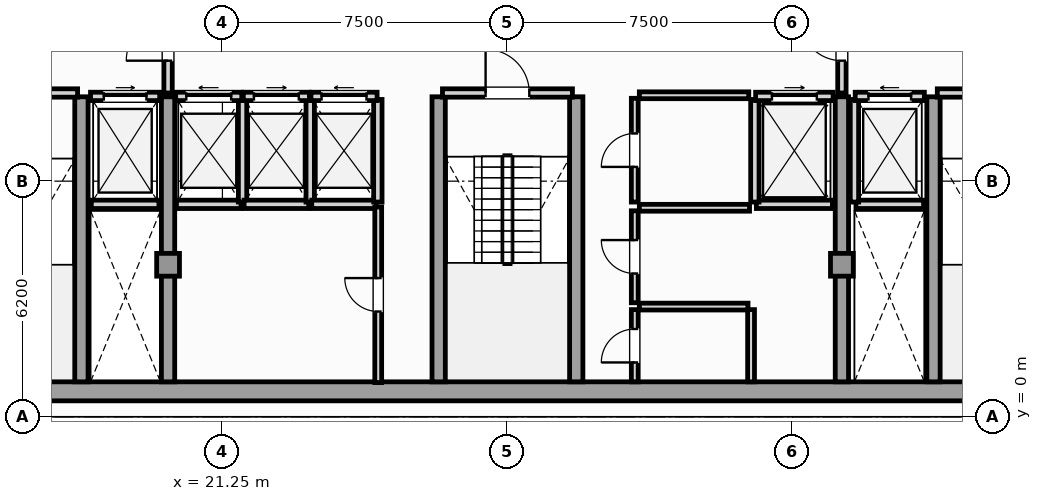
"""IFC4 building model, lengths in metres.
Left out: names, types, materials, properties, quantities, classifications, styles, units other than length and angle.
Written with IfcOpenShell. Run it as: python <this file> out.ifc"""

import sys

from ifc_helpers import new_model, si_unit, direction, frame, frame_2d, origin, origin_2d, place, context, subcontext, project, spatial, rectangle, extrude, element, fill, save


model = new_model("IFC4")
c1 = context("Model", 3, precision=1e-05, world=origin(), true_north=direction((0.0, 1.0)))
c2 = subcontext(c1, "Body", "Model", "MODEL_VIEW")
j1 = project(units=[si_unit("LENGTHUNIT", "METRE"), si_unit("PLANEANGLEUNIT", "RADIAN")], contexts=[c1])
p1 = place(None, origin())
s1 = spatial("IfcSite", under=j1, at=p1, CompositionType="ELEMENT")
p2 = place(p1, origin())
s2 = spatial("IfcBuilding", under=s1, at=p2, CompositionType="ELEMENT")
p3 = place(p2, frame((0.0, 0.0, 313.05)))
s3 = spatial("IfcBuildingStorey", under=s2, at=p3, CompositionType="ELEMENT", Elevation=313.05)
p4 = place(p3, frame((13.25, 0.67, 0.0), z_axis=(0.0, 0.0, 1.0), x_axis=(1.0, 0.0, 0.0)))
e1 = element("IfcWall", 1, at=p4, inside=s3, PredefinedType="SHEAR", context=c2, shape_type="SweptSolid", body=[
    extrude(rectangle(XDim=31.0, YDim=0.5, at=frame_2d((15.5, 0.0))), origin(), (0.0, 0.0, 1.0), 3.65),
])
for number, where, z_axis, x_axis in (
    (2, (17.54, 0.92, 0.0), (0.0, 0.0, 1.0), (0.0, 1.0, 0.0)),
    (3, (19.82, 0.92, 0.0), (0.0, 0.0, 1.0), (0.0, 1.0, 0.0)),
    (4, (26.94, 0.92, 0.0), (0.0, 0.0, 1.0), (0.0, 1.0, 0.0)),
    (5, (30.56, 0.92, 0.0), (0.0, 0.0, 1.0), (0.0, 1.0, 0.0)),
    (6, (37.55, 0.92, 0.0), (0.0, 0.0, 1.0), (0.0, 1.0, 0.0)),
    (7, (39.96, 0.92, 0.0), (0.0, 0.0, 1.0), (0.0, 1.0, 0.0)),
):
    element("IfcWall", number, at=place(p3, frame(where, z_axis=z_axis, x_axis=x_axis)), inside=s3, PredefinedType="SHEAR", context=c2, shape_type="SweptSolid", body=[
        extrude(rectangle(XDim=7.5, YDim=0.35, at=frame_2d((3.75, 0.0))), origin(), (0.0, 0.0, 1.0), 3.65),
    ])
for number, where, z_axis, x_axis in (
    (8, (19.82, 4.0, 0.0), (0.0, 0.0, 1.0), (1.0, 0.0, 0.0)),
    (9, (37.55, 4.0, 0.0), (0.0, 0.0, 1.0), (1.0, 0.0, 0.0)),
):
    element("IfcColumn", number, at=place(p3, frame(where, z_axis=z_axis, x_axis=x_axis)), inside=s3, PredefinedType="COLUMN", context=c2, shape_type="SweptSolid", body=[
        extrude(rectangle(XDim=0.6, YDim=0.6, at=origin_2d()), origin(), (0.0, 0.0, 1.0), 3.85),
    ])
p5 = place(p3, frame((17.8, 5.59, 0.0), z_axis=(0.0, 0.0, 1.0), x_axis=(1.0, 0.0, 0.0)))
e10 = element("IfcWall", 10, at=p5, inside=s3, PredefinedType="SOLIDWALL", context=c2, shape_type="SweptSolid", body=[
    extrude(rectangle(XDim=1.78, YDim=0.22, at=frame_2d((0.89, 0.0))), origin(), (0.0, 0.0, 1.0), 3.65),
])
p6 = place(p3, frame((17.78, 8.43, 0.0), z_axis=(0.0, 0.0, 1.0), x_axis=(1.0, 0.0, 0.0)))
e11 = element("IfcWall", 11, at=p6, inside=s3, PredefinedType="SOLIDWALL", context=c2, shape_type="SweptSolid", body=[
    extrude(rectangle(XDim=1.82, YDim=0.22, at=frame_2d((0.91, 0.0))), origin(), (0.0, 0.0, 1.0), 3.65),
])
p7 = place(p6, frame((0.35, 0.0, 0.0)))
e12 = element("IfcOpeningElement", 12, at=p7, cuts=e11, PredefinedType="OPENING", context=c2, shape_type="SweptSolid", body=[
    extrude(rectangle(XDim=1.12, YDim=2.25, at=frame_2d((0.56, 1.125))), frame((0.0, 0.12, 0.0), z_axis=(0.0, -1.0, 0.0), x_axis=(1.0, 0.0, 0.0)), (0.0, 0.0, 1.0), 0.24),
])
p8 = place(p3, frame((37.92, 5.59, 0.0), z_axis=(0.0, 0.0, 1.0), x_axis=(1.0, 0.0, 0.0)))
e13 = element("IfcWall", 13, at=p8, inside=s3, PredefinedType="SOLIDWALL", context=c2, shape_type="SweptSolid", body=[
    extrude(rectangle(XDim=1.78, YDim=0.22, at=frame_2d((0.89, 0.0))), origin(), (0.0, 0.0, 1.0), 3.65),
])
p9 = place(p3, frame((37.88, 5.65, 0.0), z_axis=(0.0, 0.0, 1.0), x_axis=(0.0, 1.0, 0.0)))
e14 = element("IfcWall", 14, at=p9, inside=s3, PredefinedType="SOLIDWALL", context=c2, shape_type="SweptSolid", body=[
    extrude(rectangle(XDim=2.7, YDim=0.22, at=frame_2d((1.35, 0.0))), origin(), (0.0, 0.0, 1.0), 3.65),
])
p10 = place(p3, frame((37.9, 8.43, 0.0), z_axis=(0.0, 0.0, 1.0), x_axis=(1.0, 0.0, 0.0)))
e15 = element("IfcWall", 15, at=p10, inside=s3, PredefinedType="SOLIDWALL", context=c2, shape_type="SweptSolid", body=[
    extrude(rectangle(XDim=1.82, YDim=0.22, at=frame_2d((0.91, 0.0))), origin(), (0.0, 0.0, 1.0), 3.65),
])
p11 = place(p10, frame((0.35, 0.0, 0.0)))
e16 = element("IfcOpeningElement", 16, at=p11, cuts=e15, PredefinedType="OPENING", context=c2, shape_type="SweptSolid", body=[
    extrude(rectangle(XDim=1.12, YDim=2.25, at=frame_2d((0.56, 1.125))), frame((0.0, 0.12, 0.0), z_axis=(0.0, -1.0, 0.0), x_axis=(1.0, 0.0, 0.0)), (0.0, 0.0, 1.0), 0.24),
])
p12 = place(p3, frame((35.3, 5.59, 0.0), z_axis=(0.0, 0.0, 1.0), x_axis=(1.0, 0.0, 0.0)))
e17 = element("IfcWall", 17, at=p12, inside=s3, PredefinedType="SOLIDWALL", context=c2, shape_type="SweptSolid", body=[
    extrude(rectangle(XDim=2.0, YDim=0.22, at=frame_2d((1.0, 0.0))), origin(), (0.0, 0.0, 1.0), 3.65),
])
p13 = place(p3, frame((35.26, 5.65, 0.0), z_axis=(0.0, 0.0, 1.0), x_axis=(0.0, 1.0, 0.0)))
e18 = element("IfcWall", 18, at=p13, inside=s3, PredefinedType="SOLIDWALL", context=c2, shape_type="SweptSolid", body=[
    extrude(rectangle(XDim=2.7, YDim=0.22, at=frame_2d((1.35, 0.0))), origin(), (0.0, 0.0, 1.0), 3.65),
])
p14 = place(p3, frame((35.28, 8.43, 0.0), z_axis=(0.0, 0.0, 1.0), x_axis=(1.0, 0.0, 0.0)))
e19 = element("IfcWall", 19, at=p14, inside=s3, PredefinedType="SOLIDWALL", context=c2, shape_type="SweptSolid", body=[
    extrude(rectangle(XDim=2.04, YDim=0.22, at=frame_2d((1.02, 0.0))), origin(), (0.0, 0.0, 1.0), 3.65),
])
p15 = place(p14, frame((0.43, 0.0, 0.0)))
e20 = element("IfcOpeningElement", 20, at=p15, cuts=e19, PredefinedType="OPENING", context=c2, shape_type="SweptSolid", body=[
    extrude(rectangle(XDim=1.18, YDim=2.2, at=frame_2d((0.59, 1.1))), frame((0.0, 0.12, 0.0), z_axis=(0.0, -1.0, 0.0), x_axis=(1.0, 0.0, 0.0)), (0.0, 0.0, 1.0), 0.24),
])
p16 = place(p3, frame((20.04, 5.59, 0.0), z_axis=(0.0, 0.0, 1.0), x_axis=(1.0, 0.0, 0.0)))
e21 = element("IfcWall", 21, at=p16, inside=s3, PredefinedType="SOLIDWALL", context=c2, shape_type="SweptSolid", body=[
    extrude(rectangle(XDim=1.7, YDim=0.22, at=frame_2d((0.85, 0.0))), origin(), (0.0, 0.0, 1.0), 3.65),
])
p17 = place(p3, frame((21.78, 5.65, 0.0), z_axis=(0.0, 0.0, 1.0), x_axis=(0.0, 1.0, 0.0)))
e22 = element("IfcWall", 22, at=p17, inside=s3, PredefinedType="SOLIDWALL", context=c2, shape_type="SweptSolid", body=[
    extrude(rectangle(XDim=2.7, YDim=0.22, at=frame_2d((1.35, 0.0))), origin(), (0.0, 0.0, 1.0), 3.65),
])
p18 = place(p3, frame((20.02, 8.43, 0.0), z_axis=(0.0, 0.0, 1.0), x_axis=(1.0, 0.0, 0.0)))
e23 = element("IfcWall", 23, at=p18, inside=s3, PredefinedType="SOLIDWALL", context=c2, shape_type="SweptSolid", body=[
    extrude(rectangle(XDim=1.74, YDim=0.22, at=frame_2d((0.87, 0.0))), origin(), (0.0, 0.0, 1.0), 3.65),
])
p19 = place(p18, frame((0.28, 0.0, 0.0)))
e24 = element("IfcOpeningElement", 24, at=p19, cuts=e23, PredefinedType="OPENING", context=c2, shape_type="SweptSolid", body=[
    extrude(rectangle(XDim=1.18, YDim=2.2, at=frame_2d((0.59, 1.1))), frame((0.0, 0.12, 0.0), z_axis=(0.0, -1.0, 0.0), x_axis=(1.0, 0.0, 0.0)), (0.0, 0.0, 1.0), 0.24),
])
p20 = place(p3, frame((21.82, 5.59, 0.0), z_axis=(0.0, 0.0, 1.0), x_axis=(1.0, 0.0, 0.0)))
e25 = element("IfcWall", 25, at=p20, inside=s3, PredefinedType="SOLIDWALL", context=c2, shape_type="SweptSolid", body=[
    extrude(rectangle(XDim=1.7, YDim=0.22, at=frame_2d((0.85, 0.0))), origin(), (0.0, 0.0, 1.0), 3.65),
])
p21 = place(p3, frame((23.56, 5.65, 0.0), z_axis=(0.0, 0.0, 1.0), x_axis=(0.0, 1.0, 0.0)))
e26 = element("IfcWall", 26, at=p21, inside=s3, PredefinedType="SOLIDWALL", context=c2, shape_type="SweptSolid", body=[
    extrude(rectangle(XDim=2.7, YDim=0.22, at=frame_2d((1.35, 0.0))), origin(), (0.0, 0.0, 1.0), 3.65),
])
p22 = place(p3, frame((21.8, 8.43, 0.0), z_axis=(0.0, 0.0, 1.0), x_axis=(1.0, 0.0, 0.0)))
e27 = element("IfcWall", 27, at=p22, inside=s3, PredefinedType="SOLIDWALL", context=c2, shape_type="SweptSolid", body=[
    extrude(rectangle(XDim=1.74, YDim=0.22, at=frame_2d((0.87, 0.0))), origin(), (0.0, 0.0, 1.0), 3.65),
])
p23 = place(p22, frame((0.28, 0.0, 0.0)))
e28 = element("IfcOpeningElement", 28, at=p23, cuts=e27, PredefinedType="OPENING", context=c2, shape_type="SweptSolid", body=[
    extrude(rectangle(XDim=1.18, YDim=2.2, at=frame_2d((0.59, 1.1))), frame((0.0, 0.12, 0.0), z_axis=(0.0, -1.0, 0.0), x_axis=(1.0, 0.0, 0.0)), (0.0, 0.0, 1.0), 0.24),
])
p24 = place(p3, frame((23.6, 5.59, 0.0), z_axis=(0.0, 0.0, 1.0), x_axis=(1.0, 0.0, 0.0)))
e29 = element("IfcWall", 29, at=p24, inside=s3, PredefinedType="SOLIDWALL", context=c2, shape_type="SweptSolid", body=[
    extrude(rectangle(XDim=1.7, YDim=0.22, at=frame_2d((0.85, 0.0))), origin(), (0.0, 0.0, 1.0), 3.65),
])
p25 = place(p3, frame((25.34, 5.65, 0.0), z_axis=(0.0, 0.0, 1.0), x_axis=(0.0, 1.0, 0.0)))
e30 = element("IfcWall", 30, at=p25, inside=s3, PredefinedType="SOLIDWALL", context=c2, shape_type="SweptSolid", body=[
    extrude(rectangle(XDim=2.7, YDim=0.22, at=frame_2d((1.35, 0.0))), origin(), (0.0, 0.0, 1.0), 3.65),
])
p26 = place(p3, frame((23.58, 8.43, 0.0), z_axis=(0.0, 0.0, 1.0), x_axis=(1.0, 0.0, 0.0)))
e31 = element("IfcWall", 31, at=p26, inside=s3, PredefinedType="SOLIDWALL", context=c2, shape_type="SweptSolid", body=[
    extrude(rectangle(XDim=1.74, YDim=0.22, at=frame_2d((0.87, 0.0))), origin(), (0.0, 0.0, 1.0), 3.65),
])
p27 = place(p26, frame((0.28, 0.0, 0.0)))
e32 = element("IfcOpeningElement", 32, at=p27, cuts=e31, PredefinedType="OPENING", context=c2, shape_type="SweptSolid", body=[
    extrude(rectangle(XDim=1.18, YDim=2.2, at=frame_2d((0.59, 1.1))), frame((0.0, 0.12, 0.0), z_axis=(0.0, -1.0, 0.0), x_axis=(1.0, 0.0, 0.0)), (0.0, 0.0, 1.0), 0.24),
])
p28 = place(p3, frame((14.04, 8.52, 0.0), z_axis=(0.0, 0.0, 1.0), x_axis=(1.0, 0.0, 0.0)))
e33 = element("IfcWall", 33, at=p28, inside=s3, PredefinedType="SOLIDWALL", context=c2, shape_type="SweptSolid", body=[
    extrude(rectangle(XDim=3.4, YDim=0.22, at=frame_2d((1.7, 0.0))), origin(), (0.0, 0.0, 1.0), 3.65),
])
p29 = place(p28, frame((1.125, 0.0, 0.0)))
e34 = element("IfcOpeningElement", 34, at=p29, cuts=e33, PredefinedType="OPENING", context=c2, shape_type="SweptSolid", body=[
    extrude(rectangle(XDim=1.15, YDim=2.2, at=frame_2d((0.575, 1.1))), frame((0.0, 0.12, 0.0), z_axis=(0.0, -1.0, 0.0), x_axis=(1.0, 0.0, 0.0)), (0.0, 0.0, 1.0), 0.24),
])
p30 = place(p3, frame((40.06, 8.52, 0.0), z_axis=(0.0, 0.0, 1.0), x_axis=(1.0, 0.0, 0.0)))
e35 = element("IfcWall", 35, at=p30, inside=s3, PredefinedType="SOLIDWALL", context=c2, shape_type="SweptSolid", body=[
    extrude(rectangle(XDim=3.4, YDim=0.22, at=frame_2d((1.7, 0.0))), origin(), (0.0, 0.0, 1.0), 3.65),
])
p31 = place(p30, frame((1.125, 0.0, 0.0)))
e36 = element("IfcOpeningElement", 36, at=p31, cuts=e35, PredefinedType="OPENING", context=c2, shape_type="SweptSolid", body=[
    extrude(rectangle(XDim=1.15, YDim=2.2, at=frame_2d((0.575, 1.1))), frame((0.0, 0.12, 0.0), z_axis=(0.0, -1.0, 0.0), x_axis=(1.0, 0.0, 0.0)), (0.0, 0.0, 1.0), 0.24),
])
p32 = place(p3, frame((27.04, 8.52, 0.0), z_axis=(0.0, 0.0, 1.0), x_axis=(1.0, 0.0, 0.0)))
e37 = element("IfcWall", 37, at=p32, inside=s3, PredefinedType="SOLIDWALL", context=c2, shape_type="SweptSolid", body=[
    extrude(rectangle(XDim=3.42, YDim=0.22, at=frame_2d((1.71, 0.0))), origin(), (0.0, 0.0, 1.0), 3.65),
])
p33 = place(p32, frame((1.135, 0.0, 0.0)))
e38 = element("IfcOpeningElement", 38, at=p33, cuts=e37, PredefinedType="OPENING", context=c2, shape_type="SweptSolid", body=[
    extrude(rectangle(XDim=1.15, YDim=2.2, at=frame_2d((0.575, 1.1))), frame((0.0, 0.12, 0.0), z_axis=(0.0, -1.0, 0.0), x_axis=(1.0, 0.0, 0.0)), (0.0, 0.0, 1.0), 0.24),
])
p34 = place(p3, frame((19.82, 8.52, 0.0), z_axis=(0.0, 0.0, 1.0), x_axis=(0.0, 1.0, 0.0)))
e39 = element("IfcWall", 39, at=p34, inside=s3, PredefinedType="SOLIDWALL", context=c2, shape_type="SweptSolid", body=[
    extrude(rectangle(XDim=2.8, YDim=0.22, at=frame_2d((1.4, 0.0))), origin(), (0.0, 0.0, 1.0), 3.105),
])
p35 = place(p34, frame((0.85, 0.0, 0.0)))
e40 = element("IfcOpeningElement", 40, at=p35, cuts=e39, PredefinedType="OPENING", context=c2, shape_type="SweptSolid", body=[
    extrude(rectangle(XDim=1.1, YDim=2.2, at=frame_2d((0.55, 1.1))), frame((0.0, 0.12, 0.0), z_axis=(0.0, -1.0, 0.0), x_axis=(1.0, 0.0, 0.0)), (0.0, 0.0, 1.0), 0.24),
])
p36 = place(p3, frame((37.55, 8.52, 0.0), z_axis=(0.0, 0.0, 1.0), x_axis=(0.0, 1.0, 0.0)))
e41 = element("IfcWall", 41, at=p36, inside=s3, PredefinedType="SOLIDWALL", context=c2, shape_type="SweptSolid", body=[
    extrude(rectangle(XDim=2.8, YDim=0.22, at=frame_2d((1.4, 0.0))), origin(), (0.0, 0.0, 1.0), 3.105),
])
p37 = place(p36, frame((0.85, 0.0, 0.0)))
e42 = element("IfcOpeningElement", 42, at=p37, cuts=e41, PredefinedType="OPENING", context=c2, shape_type="SweptSolid", body=[
    extrude(rectangle(XDim=1.1, YDim=2.2, at=frame_2d((0.55, 1.1))), frame((0.0, 0.12, 0.0), z_axis=(0.0, -1.0, 0.0), x_axis=(1.0, 0.0, 0.0)), (0.0, 0.0, 1.0), 0.24),
])
p38 = place(p3, frame((25.35, 0.9, 0.0), z_axis=(0.0, 0.0, 1.0), x_axis=(0.0, 1.0, 0.0)))
e43 = element("IfcWall", 43, at=p38, inside=s3, PredefinedType="PARTITIONING", context=c2, shape_type="SweptSolid", body=[
    extrude(rectangle(XDim=4.62, YDim=0.18, at=frame_2d((2.31, 0.0))), origin(), (0.0, 0.0, 1.0), 3.65),
])
p39 = place(p38, frame((1.87, 0.0, 0.0)))
e44 = element("IfcOpeningElement", 44, at=p39, cuts=e43, PredefinedType="OPENING", context=c2, shape_type="SweptSolid", body=[
    extrude(rectangle(XDim=0.88, YDim=2.05, at=frame_2d((0.44, 1.025))), frame((0.0, 0.1, 0.0), z_axis=(0.0, -1.0, 0.0), x_axis=(1.0, 0.0, 0.0)), (0.0, 0.0, 1.0), 0.2),
])
p40 = place(p3, frame((32.1, 0.92, 0.0), z_axis=(0.0, 0.0, 1.0), x_axis=(0.0, 1.0, 0.0)))
e45 = element("IfcWall", 45, at=p40, inside=s3, PredefinedType="PARTITIONING", context=c2, shape_type="SweptSolid", body=[
    extrude(rectangle(XDim=1.9, YDim=0.18, at=frame_2d((0.95, 0.0))), origin(), (0.0, 0.0, 1.0), 3.65),
])
p41 = place(p40, frame((0.51, 0.0, 0.0)))
e46 = element("IfcOpeningElement", 46, at=p41, cuts=e45, PredefinedType="OPENING", context=c2, shape_type="SweptSolid", body=[
    extrude(rectangle(XDim=0.88, YDim=2.05, at=frame_2d((0.44, 1.025))), frame((0.0, 0.1, 0.0), z_axis=(0.0, -1.0, 0.0), x_axis=(1.0, 0.0, 0.0)), (0.0, 0.0, 1.0), 0.2),
])
p42 = place(p3, frame((32.22, 2.9, 0.0), z_axis=(0.0, 0.0, 1.0), x_axis=(1.0, 0.0, 0.0)))
e47 = element("IfcWall", 47, at=p42, inside=s3, PredefinedType="PARTITIONING", context=c2, shape_type="SweptSolid", body=[
    extrude(rectangle(XDim=2.86, YDim=0.18, at=frame_2d((1.43, 0.0))), origin(), (0.0, 0.0, 1.0), 3.65),
])
p43 = place(p3, frame((35.16, 0.92, 0.0), z_axis=(0.0, 0.0, 1.0), x_axis=(0.0, 1.0, 0.0)))
e48 = element("IfcWall", 48, at=p43, inside=s3, PredefinedType="PARTITIONING", context=c2, shape_type="SweptSolid", body=[
    extrude(rectangle(XDim=1.9, YDim=0.18, at=frame_2d((0.95, 0.0))), origin(), (0.0, 0.0, 1.0), 3.65),
])
p44 = place(p3, frame((32.1, 3.0, 0.0), z_axis=(0.0, 0.0, 1.0), x_axis=(0.0, 1.0, 0.0)))
e49 = element("IfcWall", 49, at=p44, inside=s3, PredefinedType="PARTITIONING", context=c2, shape_type="SweptSolid", body=[
    extrude(rectangle(XDim=2.42, YDim=0.18, at=frame_2d((1.21, 0.0))), origin(), (0.0, 0.0, 1.0), 3.65),
])
p45 = place(p44, frame((0.77, 0.0, 0.0)))
e50 = element("IfcOpeningElement", 50, at=p45, cuts=e49, PredefinedType="OPENING", context=c2, shape_type="SweptSolid", body=[
    extrude(rectangle(XDim=0.88, YDim=2.05, at=frame_2d((0.44, 1.025))), frame((0.0, 0.1, 0.0), z_axis=(0.0, -1.0, 0.0), x_axis=(1.0, 0.0, 0.0)), (0.0, 0.0, 1.0), 0.2),
])
p46 = place(p3, frame((32.22, 5.5, 0.0), z_axis=(0.0, 0.0, 1.0), x_axis=(1.0, 0.0, 0.0)))
e51 = element("IfcWall", 51, at=p46, inside=s3, PredefinedType="PARTITIONING", context=c2, shape_type="SweptSolid", body=[
    extrude(rectangle(XDim=2.9, YDim=0.18, at=frame_2d((1.45, 0.0))), origin(), (0.0, 0.0, 1.0), 3.65),
])
p47 = place(p3, frame((32.1, 5.65, 0.0), z_axis=(0.0, 0.0, 1.0), x_axis=(0.0, 1.0, 0.0)))
e52 = element("IfcWall", 52, at=p47, inside=s3, PredefinedType="PARTITIONING", context=c2, shape_type="SweptSolid", body=[
    extrude(rectangle(XDim=2.73, YDim=0.18, at=frame_2d((1.365, 0.0))), origin(), (0.0, 0.0, 1.0), 3.65),
])
p48 = place(p47, frame((0.925, 0.0, 0.0)))
e53 = element("IfcOpeningElement", 53, at=p48, cuts=e52, PredefinedType="OPENING", context=c2, shape_type="SweptSolid", body=[
    extrude(rectangle(XDim=0.88, YDim=2.05, at=frame_2d((0.44, 1.025))), frame((0.0, 0.1, 0.0), z_axis=(0.0, -1.0, 0.0), x_axis=(1.0, 0.0, 0.0)), (0.0, 0.0, 1.0), 0.2),
])
p49 = place(p3, frame((32.22, 8.46, 0.0), z_axis=(0.0, 0.0, 1.0), x_axis=(1.0, 0.0, 0.0)))
e54 = element("IfcWall", 54, at=p49, inside=s3, PredefinedType="PARTITIONING", context=c2, shape_type="SweptSolid", body=[
    extrude(rectangle(XDim=2.88, YDim=0.18, at=frame_2d((1.44, 0.0))), origin(), (0.0, 0.0, 1.0), 3.65),
])
p50 = place(p7, origin())
e55 = element("IfcDoor", 55, at=p50, inside=s3, OperationType="SLIDING_TO_RIGHT", PredefinedType="DOOR", context=c2, shape_type="SweptSolid", body=[
    extrude(rectangle(XDim=1.12, YDim=2.25, at=frame_2d((0.56, 1.125))), frame((0.0, 0.025, 0.0), z_axis=(0.0, -1.0, 0.0), x_axis=(1.0, 0.0, 0.0)), (0.0, 0.0, 1.0), 0.05),
])
fill(e12, e55)
p51 = place(p11, origin())
e56 = element("IfcDoor", 56, at=p51, inside=s3, OperationType="SLIDING_TO_LEFT", PredefinedType="DOOR", context=c2, shape_type="SweptSolid", body=[
    extrude(rectangle(XDim=1.12, YDim=2.25, at=frame_2d((0.56, 1.125))), frame((0.0, 0.025, 0.0), z_axis=(0.0, -1.0, 0.0), x_axis=(1.0, 0.0, 0.0)), (0.0, 0.0, 1.0), 0.05),
])
fill(e16, e56)
p52 = place(p15, origin())
e57 = element("IfcDoor", 57, at=p52, inside=s3, OperationType="SLIDING_TO_RIGHT", PredefinedType="DOOR", context=c2, shape_type="SweptSolid", body=[
    extrude(rectangle(XDim=1.18, YDim=2.2, at=frame_2d((0.59, 1.1))), frame((0.0, 0.025, 0.0), z_axis=(0.0, -1.0, 0.0), x_axis=(1.0, 0.0, 0.0)), (0.0, 0.0, 1.0), 0.05),
])
fill(e20, e57)
p53 = place(p19, origin())
e58 = element("IfcDoor", 58, at=p53, inside=s3, OperationType="SLIDING_TO_LEFT", PredefinedType="DOOR", context=c2, shape_type="SweptSolid", body=[
    extrude(rectangle(XDim=1.18, YDim=2.2, at=frame_2d((0.59, 1.1))), frame((0.0, 0.025, 0.0), z_axis=(0.0, -1.0, 0.0), x_axis=(1.0, 0.0, 0.0)), (0.0, 0.0, 1.0), 0.05),
])
fill(e24, e58)
p54 = place(p23, origin())
e59 = element("IfcDoor", 59, at=p54, inside=s3, OperationType="SLIDING_TO_RIGHT", PredefinedType="DOOR", context=c2, shape_type="SweptSolid", body=[
    extrude(rectangle(XDim=1.18, YDim=2.2, at=frame_2d((0.59, 1.1))), frame((0.0, 0.025, 0.0), z_axis=(0.0, -1.0, 0.0), x_axis=(1.0, 0.0, 0.0)), (0.0, 0.0, 1.0), 0.05),
])
fill(e28, e59)
p55 = place(p27, origin())
e60 = element("IfcDoor", 60, at=p55, inside=s3, OperationType="SLIDING_TO_LEFT", PredefinedType="DOOR", context=c2, shape_type="SweptSolid", body=[
    extrude(rectangle(XDim=1.18, YDim=2.2, at=frame_2d((0.59, 1.1))), frame((0.0, 0.025, 0.0), z_axis=(0.0, -1.0, 0.0), x_axis=(1.0, 0.0, 0.0)), (0.0, 0.0, 1.0), 0.05),
])
fill(e32, e60)
p56 = place(p33, origin())
e61 = element("IfcDoor", 61, at=p56, inside=s3, OperationType="SINGLE_SWING_LEFT", PredefinedType="DOOR", context=c2, shape_type="SweptSolid", body=[
    extrude(rectangle(XDim=1.15, YDim=2.2, at=frame_2d((0.575, 1.1))), frame((0.0, 0.025, 0.0), z_axis=(0.0, -1.0, 0.0), x_axis=(1.0, 0.0, 0.0)), (0.0, 0.0, 1.0), 0.05),
])
fill(e38, e61)
p57 = place(p35, origin())
e62 = element("IfcDoor", 62, at=p57, inside=s3, OperationType="SINGLE_SWING_LEFT", PredefinedType="DOOR", context=c2, shape_type="SweptSolid", body=[
    extrude(rectangle(XDim=1.1, YDim=2.2, at=frame_2d((0.55, 1.1))), frame((0.0, 0.025, 0.0), z_axis=(0.0, -1.0, 0.0), x_axis=(1.0, 0.0, 0.0)), (0.0, 0.0, 1.0), 0.05),
])
fill(e40, e62)
p58 = place(p37, origin())
e63 = element("IfcDoor", 63, at=p58, inside=s3, OperationType="SINGLE_SWING_RIGHT", PredefinedType="DOOR", context=c2, shape_type="SweptSolid", body=[
    extrude(rectangle(XDim=1.1, YDim=2.2, at=frame_2d((0.55, 1.1))), frame((0.0, 0.025, 0.0), z_axis=(0.0, -1.0, 0.0), x_axis=(1.0, 0.0, 0.0)), (0.0, 0.0, 1.0), 0.05),
])
fill(e42, e63)
p59 = place(p39, origin())
e64 = element("IfcDoor", 64, at=p59, inside=s3, OperationType="SINGLE_SWING_RIGHT", PredefinedType="DOOR", context=c2, shape_type="SweptSolid", body=[
    extrude(rectangle(XDim=0.88, YDim=2.05, at=frame_2d((0.44, 1.025))), frame((0.0, 0.025, 0.0), z_axis=(0.0, -1.0, 0.0), x_axis=(1.0, 0.0, 0.0)), (0.0, 0.0, 1.0), 0.05),
])
fill(e44, e64)
p60 = place(p41, origin())
e65 = element("IfcDoor", 65, at=p60, inside=s3, OperationType="SINGLE_SWING_LEFT", PredefinedType="DOOR", context=c2, shape_type="SweptSolid", body=[
    extrude(rectangle(XDim=0.88, YDim=2.05, at=frame_2d((0.44, 1.025))), frame((0.0, 0.025, 0.0), z_axis=(0.0, -1.0, 0.0), x_axis=(1.0, 0.0, 0.0)), (0.0, 0.0, 1.0), 0.05),
])
fill(e46, e65)
p61 = place(p45, origin())
e66 = element("IfcDoor", 66, at=p61, inside=s3, OperationType="SINGLE_SWING_RIGHT", PredefinedType="DOOR", context=c2, shape_type="SweptSolid", body=[
    extrude(rectangle(XDim=0.88, YDim=2.05, at=frame_2d((0.44, 1.025))), frame((0.0, 0.025, 0.0), z_axis=(0.0, -1.0, 0.0), x_axis=(1.0, 0.0, 0.0)), (0.0, 0.0, 1.0), 0.05),
])
fill(e50, e66)
p62 = place(p48, origin())
e67 = element("IfcDoor", 67, at=p62, inside=s3, OperationType="SINGLE_SWING_LEFT", PredefinedType="DOOR", context=c2, shape_type="SweptSolid", body=[
    extrude(rectangle(XDim=0.88, YDim=2.05, at=frame_2d((0.44, 1.025))), frame((0.0, 0.025, 0.0), z_axis=(0.0, -1.0, 0.0), x_axis=(1.0, 0.0, 0.0)), (0.0, 0.0, 1.0), 0.05),
])
fill(e53, e67)
save(model, sys.argv[1])
